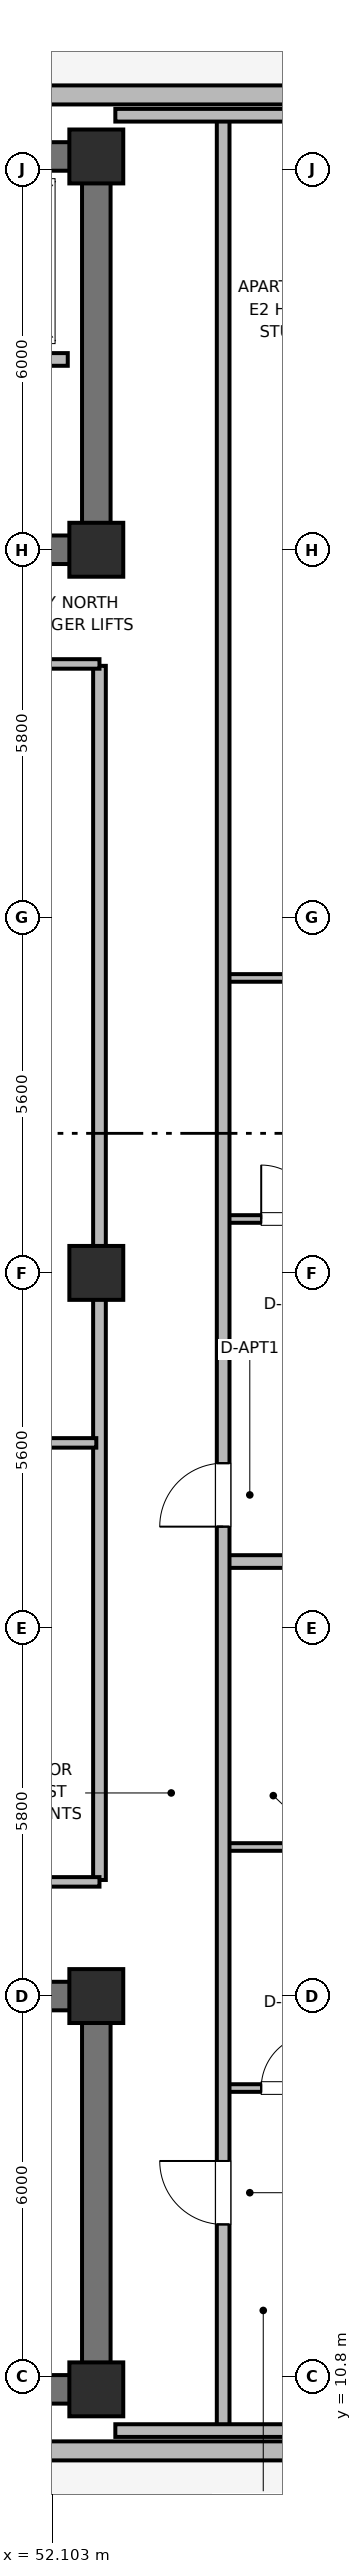
"""IFC4 building model, lengths in metres.
Left out: names, types, materials, properties, quantities, classifications, styles, units other than length and angle.
Written with IfcOpenShell. Run it as: python <this file> out.ifc"""

import sys

from ifc_helpers import new_model, si_unit, direction, frame, frame_2d, origin, origin_2d, place, context, subcontext, project, spatial, rectangle, extrude, element, fill, save


model = new_model("IFC4")
c1 = context("Model", 3, precision=1e-05, world=origin(), true_north=direction((0.0, 1.0)))
c2 = subcontext(c1, "Body", "Model", "MODEL_VIEW")
j1 = project(units=[si_unit("LENGTHUNIT", "METRE"), si_unit("PLANEANGLEUNIT", "RADIAN")], contexts=[c1])
p1 = place(None, origin())
s1 = spatial("IfcSite", under=j1, at=p1, CompositionType="ELEMENT")
p2 = place(p1, origin())
s2 = spatial("IfcBuilding", under=s1, at=p2, CompositionType="ELEMENT")
p3 = place(p2, frame((0.0, 0.0, 225.8)))
s3 = spatial("IfcBuildingStorey", under=s2, at=p3, CompositionType="ELEMENT", Elevation=225.8)
p4 = place(p3, frame((52.8, 10.6, 0.0), z_axis=(0.0, 0.0, 1.0), x_axis=(-1.0, 0.0, 0.0)))
e1 = element("IfcWall", 1, at=p4, inside=s3, PredefinedType="SHEAR", context=c2, shape_type="SweptSolid", body=[
    extrude(rectangle(XDim=27.2, YDim=0.45, at=frame_2d((13.6, 0.0))), origin(), (0.0, 0.0, 1.0), 3.7),
])
p5 = place(p3, frame((52.8, 10.825, 0.0), z_axis=(0.0, 0.0, 1.0), x_axis=(0.0, 1.0, 0.0)))
e2 = element("IfcWall", 2, at=p5, inside=s3, PredefinedType="SHEAR", context=c2, shape_type="SweptSolid", body=[
    extrude(rectangle(XDim=5.75, YDim=0.45, at=frame_2d((2.875, 0.0))), origin(), (0.0, 0.0, 1.0), 3.7),
])
p6 = place(p3, frame((25.6, 16.8, 0.0), z_axis=(0.0, 0.0, 1.0), x_axis=(1.0, 0.0, 0.0)))
e3 = element("IfcWall", 3, at=p6, inside=s3, PredefinedType="SHEAR", context=c2, shape_type="SweptSolid", body=[
    extrude(rectangle(XDim=27.2, YDim=0.45, at=frame_2d((13.6, 0.0))), origin(), (0.0, 0.0, 1.0), 3.7),
])
p7 = place(p6, frame((1.8, 0.0, 0.0)))
e4 = element("IfcOpeningElement", 4, at=p7, cuts=e3, PredefinedType="OPENING", context=c2, shape_type="SweptSolid", body=[
    extrude(rectangle(XDim=1.1, YDim=2.15, at=frame_2d((0.55, 1.075))), frame((0.0, 0.235, 0.0), z_axis=(0.0, -1.0, 0.0), x_axis=(1.0, 0.0, 0.0)), (0.0, 0.0, 1.0), 0.47),
])
p8 = place(p6, frame((5.6, 0.0, 0.0)))
e5 = element("IfcOpeningElement", 5, at=p8, cuts=e3, PredefinedType="OPENING", context=c2, shape_type="SweptSolid", body=[
    extrude(rectangle(XDim=0.85, YDim=2.1, at=frame_2d((0.425, 1.05))), frame((0.0, 0.235, 0.0), z_axis=(0.0, -1.0, 0.0), x_axis=(1.0, 0.0, 0.0)), (0.0, 0.0, 1.0), 0.47),
])
p9 = place(p6, frame((13.0, 0.0, 0.0)))
e6 = element("IfcOpeningElement", 6, at=p9, cuts=e3, PredefinedType="OPENING", context=c2, shape_type="SweptSolid", body=[
    extrude(rectangle(XDim=1.2, YDim=2.15, at=frame_2d((0.6, 1.075))), frame((0.0, 0.235, 0.0), z_axis=(0.0, -1.0, 0.0), x_axis=(1.0, 0.0, 0.0)), (0.0, 0.0, 1.0), 0.47),
])
p10 = place(p6, frame((19.2, 0.0, 0.0)))
e7 = element("IfcOpeningElement", 7, at=p10, cuts=e3, PredefinedType="OPENING", context=c2, shape_type="SweptSolid", body=[
    extrude(rectangle(XDim=0.85, YDim=2.1, at=frame_2d((0.425, 1.05))), frame((0.0, 0.235, 0.0), z_axis=(0.0, -1.0, 0.0), x_axis=(1.0, 0.0, 0.0)), (0.0, 0.0, 1.0), 0.47),
])
p11 = place(p6, frame((23.8, 0.0, 0.0)))
e8 = element("IfcOpeningElement", 8, at=p11, cuts=e3, PredefinedType="OPENING", context=c2, shape_type="SweptSolid", body=[
    extrude(rectangle(XDim=0.9, YDim=2.1, at=frame_2d((0.45, 1.05))), frame((0.0, 0.235, 0.0), z_axis=(0.0, -1.0, 0.0), x_axis=(1.0, 0.0, 0.0)), (0.0, 0.0, 1.0), 0.47),
])
p12 = place(p3, frame((25.6, 45.8, 0.0), z_axis=(0.0, 0.0, 1.0), x_axis=(1.0, 0.0, 0.0)))
e9 = element("IfcWall", 9, at=p12, inside=s3, PredefinedType="SHEAR", context=c2, shape_type="SweptSolid", body=[
    extrude(rectangle(XDim=27.2, YDim=0.45, at=frame_2d((13.6, 0.0))), origin(), (0.0, 0.0, 1.0), 3.7),
])
p13 = place(p3, frame((52.8, 39.825, 0.0), z_axis=(0.0, 0.0, 1.0), x_axis=(0.0, 1.0, 0.0)))
e10 = element("IfcWall", 10, at=p13, inside=s3, PredefinedType="SHEAR", context=c2, shape_type="SweptSolid", body=[
    extrude(rectangle(XDim=5.75, YDim=0.45, at=frame_2d((2.875, 0.0))), origin(), (0.0, 0.0, 1.0), 3.7),
])
p14 = place(p3, frame((52.8, 39.6, 0.0), z_axis=(0.0, 0.0, 1.0), x_axis=(-1.0, 0.0, 0.0)))
e11 = element("IfcWall", 11, at=p14, inside=s3, PredefinedType="SHEAR", context=c2, shape_type="SweptSolid", body=[
    extrude(rectangle(XDim=27.2, YDim=0.45, at=frame_2d((13.6, 0.0))), origin(), (0.0, 0.0, 1.0), 3.7),
])
p15 = place(p14, frame((24.2, 0.0, 0.0)))
e12 = element("IfcOpeningElement", 12, at=p15, cuts=e11, PredefinedType="OPENING", context=c2, shape_type="SweptSolid", body=[
    extrude(rectangle(XDim=1.1, YDim=2.15, at=frame_2d((0.55, 1.075))), frame((0.0, 0.235, 0.0), z_axis=(0.0, -1.0, 0.0), x_axis=(1.0, 0.0, 0.0)), (0.0, 0.0, 1.0), 0.47),
])
p16 = place(p14, frame((20.55, 0.0, 0.0)))
e13 = element("IfcOpeningElement", 13, at=p16, cuts=e11, PredefinedType="OPENING", context=c2, shape_type="SweptSolid", body=[
    extrude(rectangle(XDim=0.95, YDim=2.1, at=frame_2d((0.475, 1.05))), frame((0.0, 0.235, 0.0), z_axis=(0.0, -1.0, 0.0), x_axis=(1.0, 0.0, 0.0)), (0.0, 0.0, 1.0), 0.47),
])
p17 = place(p14, frame((15.1, 0.0, 0.0)))
e14 = element("IfcOpeningElement", 14, at=p17, cuts=e11, PredefinedType="OPENING", context=c2, shape_type="SweptSolid", body=[
    extrude(rectangle(XDim=1.2, YDim=2.15, at=frame_2d((0.6, 1.075))), frame((0.0, 0.235, 0.0), z_axis=(0.0, -1.0, 0.0), x_axis=(1.0, 0.0, 0.0)), (0.0, 0.0, 1.0), 0.47),
])
p18 = place(p14, frame((13.05, 0.0, 0.0)))
e15 = element("IfcOpeningElement", 15, at=p18, cuts=e11, PredefinedType="OPENING", context=c2, shape_type="SweptSolid", body=[
    extrude(rectangle(XDim=0.85, YDim=2.1, at=frame_2d((0.425, 1.05))), frame((0.0, 0.235, 0.0), z_axis=(0.0, -1.0, 0.0), x_axis=(1.0, 0.0, 0.0)), (0.0, 0.0, 1.0), 0.47),
])
p19 = place(p14, frame((11.0, 0.0, 0.0)))
e16 = element("IfcOpeningElement", 16, at=p19, cuts=e11, PredefinedType="OPENING", context=c2, shape_type="SweptSolid", body=[
    extrude(rectangle(XDim=0.85, YDim=2.1, at=frame_2d((0.425, 1.05))), frame((0.0, 0.235, 0.0), z_axis=(0.0, -1.0, 0.0), x_axis=(1.0, 0.0, 0.0)), (0.0, 0.0, 1.0), 0.47),
])
p20 = place(p14, frame((7.35, 0.0, 0.0)))
e17 = element("IfcOpeningElement", 17, at=p20, cuts=e11, PredefinedType="OPENING", context=c2, shape_type="SweptSolid", body=[
    extrude(rectangle(XDim=0.85, YDim=2.1, at=frame_2d((0.425, 1.05))), frame((0.0, 0.235, 0.0), z_axis=(0.0, -1.0, 0.0), x_axis=(1.0, 0.0, 0.0)), (0.0, 0.0, 1.0), 0.47),
])
p21 = place(p14, frame((4.2, 0.0, 0.0)))
e18 = element("IfcOpeningElement", 18, at=p21, cuts=e11, PredefinedType="OPENING", context=c2, shape_type="SweptSolid", body=[
    extrude(rectangle(XDim=1.3, YDim=2.2, at=frame_2d((0.65, 1.1))), frame((0.0, 0.235, 0.0), z_axis=(0.0, -1.0, 0.0), x_axis=(1.0, 0.0, 0.0)), (0.0, 0.0, 1.0), 0.47),
])
for number, where, z_axis, x_axis in (
    (19, (52.8, 10.6, 0.0), (0.0, 0.0, 1.0), (1.0, 0.0, 0.0)),
    (20, (52.8, 16.8, 0.0), (0.0, 0.0, 1.0), (1.0, 0.0, 0.0)),
    (21, (52.8, 39.6, 0.0), (0.0, 0.0, 1.0), (1.0, 0.0, 0.0)),
    (22, (52.8, 45.8, 0.0), (0.0, 0.0, 1.0), (1.0, 0.0, 0.0)),
    (23, (52.8, 28.2, 0.0), (0.0, 0.0, 1.0), (1.0, 0.0, 0.0)),
):
    element("IfcColumn", number, at=place(p3, frame(where, z_axis=z_axis, x_axis=x_axis)), inside=s3, PredefinedType="COLUMN", context=c2, shape_type="SweptSolid", body=[
        extrude(rectangle(XDim=0.85, YDim=0.85, at=origin_2d()), origin(), (0.0, 0.0, 1.0), 3.7),
    ])
p22 = place(p3, frame((22.56, 9.63, 0.0), z_axis=(0.0, 0.0, 1.0), x_axis=(1.0, 0.0, 0.0)))
e24 = element("IfcWall", 24, at=p22, inside=s3, PredefinedType="SOLIDWALL", context=c2, shape_type="SweptSolid", body=[
    extrude(rectangle(XDim=33.28, YDim=0.3, at=frame_2d((16.64, 0.0))), origin(), (0.0, 0.0, 1.0), 2.73),
])
p23 = place(p22, frame((4.647, 0.0, 0.71)))
e25 = element("IfcOpeningElement", 25, at=p23, cuts=e24, PredefinedType="OPENING", context=c2, shape_type="SweptSolid", body=[
    extrude(rectangle(XDim=1.6, YDim=1.9, at=frame_2d((0.8, 0.95))), frame((0.0, 0.16, 0.0), z_axis=(0.0, -1.0, 0.0), x_axis=(1.0, 0.0, 0.0)), (0.0, 0.0, 1.0), 0.32),
])
p24 = place(p22, frame((7.845, 0.0, 0.71)))
e26 = element("IfcOpeningElement", 26, at=p24, cuts=e24, PredefinedType="OPENING", context=c2, shape_type="SweptSolid", body=[
    extrude(rectangle(XDim=1.6, YDim=1.9, at=frame_2d((0.8, 0.95))), frame((0.0, 0.16, 0.0), z_axis=(0.0, -1.0, 0.0), x_axis=(1.0, 0.0, 0.0)), (0.0, 0.0, 1.0), 0.32),
])
p25 = place(p22, frame((14.241, 0.0, 0.71)))
e27 = element("IfcOpeningElement", 27, at=p25, cuts=e24, PredefinedType="OPENING", context=c2, shape_type="SweptSolid", body=[
    extrude(rectangle(XDim=1.6, YDim=1.9, at=frame_2d((0.8, 0.95))), frame((0.0, 0.16, 0.0), z_axis=(0.0, -1.0, 0.0), x_axis=(1.0, 0.0, 0.0)), (0.0, 0.0, 1.0), 0.32),
])
p26 = place(p22, frame((17.439, 0.0, 0.71)))
e28 = element("IfcOpeningElement", 28, at=p26, cuts=e24, PredefinedType="OPENING", context=c2, shape_type="SweptSolid", body=[
    extrude(rectangle(XDim=1.6, YDim=1.9, at=frame_2d((0.8, 0.95))), frame((0.0, 0.16, 0.0), z_axis=(0.0, -1.0, 0.0), x_axis=(1.0, 0.0, 0.0)), (0.0, 0.0, 1.0), 0.32),
])
p27 = place(p22, frame((23.835, 0.0, 0.71)))
e29 = element("IfcOpeningElement", 29, at=p27, cuts=e24, PredefinedType="OPENING", context=c2, shape_type="SweptSolid", body=[
    extrude(rectangle(XDim=1.6, YDim=1.9, at=frame_2d((0.8, 0.95))), frame((0.0, 0.16, 0.0), z_axis=(0.0, -1.0, 0.0), x_axis=(1.0, 0.0, 0.0)), (0.0, 0.0, 1.0), 0.32),
])
p28 = place(p22, frame((27.033, 0.0, 0.71)))
e30 = element("IfcOpeningElement", 30, at=p28, cuts=e24, PredefinedType="OPENING", context=c2, shape_type="SweptSolid", body=[
    extrude(rectangle(XDim=1.6, YDim=1.9, at=frame_2d((0.8, 0.95))), frame((0.0, 0.16, 0.0), z_axis=(0.0, -1.0, 0.0), x_axis=(1.0, 0.0, 0.0)), (0.0, 0.0, 1.0), 0.32),
])
p29 = place(p3, frame((55.84, 46.77, 0.0), z_axis=(0.0, 0.0, 1.0), x_axis=(-1.0, 0.0, 0.0)))
e31 = element("IfcWall", 31, at=p29, inside=s3, PredefinedType="SOLIDWALL", context=c2, shape_type="SweptSolid", body=[
    extrude(rectangle(XDim=33.28, YDim=0.3, at=frame_2d((16.64, 0.0))), origin(), (0.0, 0.0, 1.0), 2.73),
])
p30 = place(p29, frame((4.93, 0.0, 0.71)))
e32 = element("IfcOpeningElement", 32, at=p30, cuts=e31, PredefinedType="OPENING", context=c2, shape_type="SweptSolid", body=[
    extrude(rectangle(XDim=2.1, YDim=1.9, at=frame_2d((1.05, 0.95))), frame((0.0, 0.16, 0.0), z_axis=(0.0, -1.0, 0.0), x_axis=(1.0, 0.0, 0.0)), (0.0, 0.0, 1.0), 0.32),
])
p31 = place(p29, frame((8.483, 0.0, 0.71)))
e33 = element("IfcOpeningElement", 33, at=p31, cuts=e31, PredefinedType="OPENING", context=c2, shape_type="SweptSolid", body=[
    extrude(rectangle(XDim=2.1, YDim=1.9, at=frame_2d((1.05, 0.95))), frame((0.0, 0.16, 0.0), z_axis=(0.0, -1.0, 0.0), x_axis=(1.0, 0.0, 0.0)), (0.0, 0.0, 1.0), 0.32),
])
p32 = place(p29, frame((15.59, 0.0, 0.71)))
e34 = element("IfcOpeningElement", 34, at=p32, cuts=e31, PredefinedType="OPENING", context=c2, shape_type="SweptSolid", body=[
    extrude(rectangle(XDim=2.1, YDim=1.9, at=frame_2d((1.05, 0.95))), frame((0.0, 0.16, 0.0), z_axis=(0.0, -1.0, 0.0), x_axis=(1.0, 0.0, 0.0)), (0.0, 0.0, 1.0), 0.32),
])
p33 = place(p29, frame((22.697, 0.0, 0.71)))
e35 = element("IfcOpeningElement", 35, at=p33, cuts=e31, PredefinedType="OPENING", context=c2, shape_type="SweptSolid", body=[
    extrude(rectangle(XDim=2.1, YDim=1.9, at=frame_2d((1.05, 0.95))), frame((0.0, 0.16, 0.0), z_axis=(0.0, -1.0, 0.0), x_axis=(1.0, 0.0, 0.0)), (0.0, 0.0, 1.0), 0.32),
])
p34 = place(p29, frame((26.25, 0.0, 0.71)))
e36 = element("IfcOpeningElement", 36, at=p34, cuts=e31, PredefinedType="OPENING", context=c2, shape_type="SweptSolid", body=[
    extrude(rectangle(XDim=2.1, YDim=1.9, at=frame_2d((1.05, 0.95))), frame((0.0, 0.16, 0.0), z_axis=(0.0, -1.0, 0.0), x_axis=(1.0, 0.0, 0.0)), (0.0, 0.0, 1.0), 0.32),
])
p35 = place(p3, frame((52.35, 42.6, 0.0), z_axis=(0.0, 0.0, 1.0), x_axis=(-1.0, 0.0, 0.0)))
e37 = element("IfcWall", 37, at=p35, inside=s3, PredefinedType="PARTITIONING", context=c2, shape_type="SweptSolid", body=[
    extrude(rectangle(XDim=6.5, YDim=0.2, at=frame_2d((3.25, 0.0))), origin(), (0.0, 0.0, 1.0), 2.56),
])
p36 = place(p35, frame((4.9, 0.0, 0.0)))
e38 = element("IfcOpeningElement", 38, at=p36, cuts=e37, PredefinedType="OPENING", context=c2, shape_type="SweptSolid", body=[
    extrude(rectangle(XDim=1.0, YDim=2.15, at=frame_2d((0.5, 1.075))), frame((0.0, 0.11, 0.0), z_axis=(0.0, -1.0, 0.0), x_axis=(1.0, 0.0, 0.0)), (0.0, 0.0, 1.0), 0.22),
])
p37 = place(p35, frame((2.8, 0.0, 0.0)))
e39 = element("IfcOpeningElement", 39, at=p37, cuts=e37, PredefinedType="OPENING", context=c2, shape_type="SweptSolid", body=[
    extrude(rectangle(XDim=1.0, YDim=2.15, at=frame_2d((0.5, 1.075))), frame((0.0, 0.11, 0.0), z_axis=(0.0, -1.0, 0.0), x_axis=(1.0, 0.0, 0.0)), (0.0, 0.0, 1.0), 0.22),
])
p38 = place(p35, frame((0.7, 0.0, 0.0)))
e40 = element("IfcOpeningElement", 40, at=p38, cuts=e37, PredefinedType="OPENING", context=c2, shape_type="SweptSolid", body=[
    extrude(rectangle(XDim=1.0, YDim=2.15, at=frame_2d((0.5, 1.075))), frame((0.0, 0.11, 0.0), z_axis=(0.0, -1.0, 0.0), x_axis=(1.0, 0.0, 0.0)), (0.0, 0.0, 1.0), 0.22),
])
p39 = place(p3, frame((52.85, 18.63, 0.0), z_axis=(0.0, 0.0, 1.0), x_axis=(0.0, 1.0, 0.0)))
e41 = element("IfcWall", 41, at=p39, inside=s3, PredefinedType="PARTITIONING", context=c2, shape_type="SweptSolid", body=[
    extrude(rectangle(XDim=19.14, YDim=0.2, at=frame_2d((9.57, 0.0))), origin(), (0.0, 0.0, 1.0), 2.56),
])
for number, where, z_axis, x_axis in (
    (42, (29.9, 18.6, 0.0), (0.0, 0.0, 1.0), (1.0, 0.0, 0.0)),
    (43, (29.9, 37.8, 0.0), (0.0, 0.0, 1.0), (1.0, 0.0, 0.0)),
):
    element("IfcWall", number, at=place(p3, frame(where, z_axis=z_axis, x_axis=x_axis)), inside=s3, PredefinedType="PARTITIONING", context=c2, shape_type="SweptSolid", body=[
        extrude(rectangle(XDim=22.95, YDim=0.15, at=frame_2d((11.475, 0.0))), origin(), (0.0, 0.0, 1.0), 2.56),
    ])
p40 = place(p3, frame((29.93, 25.521, 0.0), z_axis=(0.0, 0.0, 1.0), x_axis=(1.0, 0.0, 0.0)))
e44 = element("IfcWall", 44, at=p40, inside=s3, PredefinedType="PARTITIONING", context=c2, shape_type="SweptSolid", body=[
    extrude(rectangle(XDim=22.87, YDim=0.15, at=frame_2d((11.435, 0.0))), origin(), (0.0, 0.0, 1.0), 2.56),
])
p41 = place(p3, frame((54.8, 15.35, 0.0), z_axis=(0.0, 0.0, 1.0), x_axis=(1.0, 0.0, 0.0)))
e45 = element("IfcWall", 45, at=p41, inside=s3, PredefinedType="PARTITIONING", context=c2, shape_type="SweptSolid", body=[
    extrude(rectangle(XDim=1.95, YDim=0.12, at=frame_2d((0.975, 0.0))), origin(), (0.0, 0.0, 1.0), 2.56),
])
p42 = place(p41, frame((0.6, 0.0, 0.0)))
e46 = element("IfcOpeningElement", 46, at=p42, cuts=e45, PredefinedType="OPENING", context=c2, shape_type="SweptSolid", body=[
    extrude(rectangle(XDim=0.85, YDim=2.1, at=frame_2d((0.425, 1.05))), frame((0.0, 0.07, 0.0), z_axis=(0.0, -1.0, 0.0), x_axis=(1.0, 0.0, 0.0)), (0.0, 0.0, 1.0), 0.14),
])
p43 = place(p3, frame((54.8, 19.15, 0.0), z_axis=(0.0, 0.0, 1.0), x_axis=(1.0, 0.0, 0.0)))
e47 = element("IfcWall", 47, at=p43, inside=s3, PredefinedType="PARTITIONING", context=c2, shape_type="SweptSolid", body=[
    extrude(rectangle(XDim=1.95, YDim=0.12, at=frame_2d((0.975, 0.0))), origin(), (0.0, 0.0, 1.0), 2.56),
])
p44 = place(p3, frame((54.8, 23.65, 0.0), z_axis=(0.0, 0.0, 1.0), x_axis=(1.0, 0.0, 0.0)))
e48 = element("IfcWall", 48, at=p44, inside=s3, PredefinedType="PARTITIONING", context=c2, shape_type="SweptSolid", body=[
    extrude(rectangle(XDim=4.07, YDim=0.2, at=frame_2d((2.035, 0.0))), origin(), (0.0, 0.0, 1.0), 2.56),
])
p45 = place(p3, frame((54.8, 29.05, 0.0), z_axis=(0.0, 0.0, 1.0), x_axis=(1.0, 0.0, 0.0)))
e49 = element("IfcWall", 49, at=p45, inside=s3, PredefinedType="PARTITIONING", context=c2, shape_type="SweptSolid", body=[
    extrude(rectangle(XDim=1.95, YDim=0.12, at=frame_2d((0.975, 0.0))), origin(), (0.0, 0.0, 1.0), 2.56),
])
p46 = place(p45, frame((0.6, 0.0, 0.0)))
e50 = element("IfcOpeningElement", 50, at=p46, cuts=e49, PredefinedType="OPENING", context=c2, shape_type="SweptSolid", body=[
    extrude(rectangle(XDim=0.85, YDim=2.1, at=frame_2d((0.425, 1.05))), frame((0.0, 0.07, 0.0), z_axis=(0.0, -1.0, 0.0), x_axis=(1.0, 0.0, 0.0)), (0.0, 0.0, 1.0), 0.14),
])
p47 = place(p3, frame((54.8, 32.85, 0.0), z_axis=(0.0, 0.0, 1.0), x_axis=(1.0, 0.0, 0.0)))
e51 = element("IfcWall", 51, at=p47, inside=s3, PredefinedType="PARTITIONING", context=c2, shape_type="SweptSolid", body=[
    extrude(rectangle(XDim=1.95, YDim=0.12, at=frame_2d((0.975, 0.0))), origin(), (0.0, 0.0, 1.0), 2.56),
])
p48 = place(p3, frame((54.8, 9.95, 0.0), z_axis=(0.0, 0.0, 1.0), x_axis=(0.0, 1.0, 0.0)))
e52 = element("IfcWall", 52, at=p48, inside=s3, PredefinedType="PARTITIONING", context=c2, shape_type="SweptSolid", body=[
    extrude(rectangle(XDim=36.5, YDim=0.2, at=frame_2d((18.25, 0.0))), origin(), (0.0, 0.0, 1.0), 2.56),
])
p49 = place(p48, frame((3.25, 0.0, 0.0)))
e53 = element("IfcOpeningElement", 53, at=p49, cuts=e52, PredefinedType="OPENING", context=c2, shape_type="SweptSolid", body=[
    extrude(rectangle(XDim=1.0, YDim=2.15, at=frame_2d((0.5, 1.075))), frame((0.0, 0.11, 0.0), z_axis=(0.0, -1.0, 0.0), x_axis=(1.0, 0.0, 0.0)), (0.0, 0.0, 1.0), 0.22),
])
p50 = place(p48, frame((14.25, 0.0, 0.0)))
e54 = element("IfcOpeningElement", 54, at=p50, cuts=e52, PredefinedType="OPENING", context=c2, shape_type="SweptSolid", body=[
    extrude(rectangle(XDim=1.0, YDim=2.15, at=frame_2d((0.5, 1.075))), frame((0.0, 0.11, 0.0), z_axis=(0.0, -1.0, 0.0), x_axis=(1.0, 0.0, 0.0)), (0.0, 0.0, 1.0), 0.22),
])
for number, where, z_axis, x_axis in (
    (55, (53.1, 9.95, 0.0), (0.0, 0.0, 1.0), (1.0, 0.0, 0.0)),
    (56, (53.1, 46.45, 0.0), (0.0, 0.0, 1.0), (1.0, 0.0, 0.0)),
):
    element("IfcWall", number, at=place(p3, frame(where, z_axis=z_axis, x_axis=x_axis)), inside=s3, PredefinedType="PARTITIONING", context=c2, shape_type="SweptSolid", body=[
        extrude(rectangle(XDim=3.754, YDim=0.2, at=frame_2d((1.877, 0.0))), origin(), (0.0, 0.0, 1.0), 2.56),
    ])
p51 = place(p42, origin())
e57 = element("IfcDoor", 57, at=p51, inside=s3, OperationType="SINGLE_SWING_RIGHT", PredefinedType="DOOR", context=c2, shape_type="SweptSolid", body=[
    extrude(rectangle(XDim=0.85, YDim=2.1, at=frame_2d((0.425, 1.05))), frame((0.0, 0.025, 0.0), z_axis=(0.0, -1.0, 0.0), x_axis=(1.0, 0.0, 0.0)), (0.0, 0.0, 1.0), 0.05),
])
fill(e46, e57)
p52 = place(p46, origin())
e58 = element("IfcDoor", 58, at=p52, inside=s3, OperationType="SINGLE_SWING_LEFT", PredefinedType="DOOR", context=c2, shape_type="SweptSolid", body=[
    extrude(rectangle(XDim=0.85, YDim=2.1, at=frame_2d((0.425, 1.05))), frame((0.0, 0.025, 0.0), z_axis=(0.0, -1.0, 0.0), x_axis=(1.0, 0.0, 0.0)), (0.0, 0.0, 1.0), 0.05),
])
fill(e50, e58)
p53 = place(p49, origin())
e59 = element("IfcDoor", 59, at=p53, inside=s3, OperationType="SINGLE_SWING_RIGHT", PredefinedType="DOOR", context=c2, shape_type="SweptSolid", body=[
    extrude(rectangle(XDim=1.0, YDim=2.15, at=frame_2d((0.5, 1.075))), frame((0.0, 0.025, 0.0), z_axis=(0.0, -1.0, 0.0), x_axis=(1.0, 0.0, 0.0)), (0.0, 0.0, 1.0), 0.05),
])
fill(e53, e59)
p54 = place(p50, origin())
e60 = element("IfcDoor", 60, at=p54, inside=s3, OperationType="SINGLE_SWING_LEFT", PredefinedType="DOOR", context=c2, shape_type="SweptSolid", body=[
    extrude(rectangle(XDim=1.0, YDim=2.15, at=frame_2d((0.5, 1.075))), frame((0.0, 0.025, 0.0), z_axis=(0.0, -1.0, 0.0), x_axis=(1.0, 0.0, 0.0)), (0.0, 0.0, 1.0), 0.05),
])
fill(e54, e60)
save(model, sys.argv[1])
